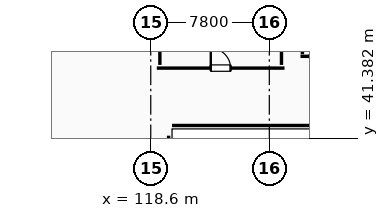
"""IFC4 building model, lengths in metres.
Left out: names, types, materials, properties, quantities, classifications, styles, units other than length and angle.
Written with IfcOpenShell. Run it as: python <this file> out.ifc"""

import sys

from ifc_helpers import new_model, si_unit, direction, frame, frame_2d, origin, origin_2d, place, context, subcontext, project, spatial, rectangle, extrude, element, fill, save


model = new_model("IFC4")
c1 = context("Model", 3, precision=1e-05, world=origin(), true_north=direction((0.0, 1.0)))
c2 = subcontext(c1, "Body", "Model", "MODEL_VIEW")
j1 = project(units=[si_unit("LENGTHUNIT", "METRE"), si_unit("PLANEANGLEUNIT", "RADIAN")], contexts=[c1])
p1 = place(None, origin())
s1 = spatial("IfcSite", under=j1, at=p1, CompositionType="ELEMENT")
p2 = place(p1, origin())
s2 = spatial("IfcBuilding", under=s1, at=p2, CompositionType="ELEMENT")
p3 = place(p2, frame((0.0, 0.0, -4.8)))
s3 = spatial("IfcBuildingStorey", under=s2, at=p3, CompositionType="ELEMENT", Elevation=-4.8)
p4 = place(p3, frame((112.6, 41.0, 0.0), z_axis=(0.0, 0.0, 1.0), x_axis=(1.0, 0.0, 0.0)))
e1 = element("IfcColumn", 1, at=p4, inside=s3, PredefinedType="COLUMN", context=c2, shape_type="SweptSolid", body=[
    extrude(rectangle(XDim=1.2, YDim=1.2, at=origin_2d()), origin(), (0.0, 0.0, 1.0), 4.8),
])
p5 = place(p3, frame((131.2, 42.225, 0.0), z_axis=(0.0, 0.0, 1.0), x_axis=(-1.0, 0.0, 0.0)))
e2 = element("IfcWall", 2, at=p5, inside=s3, PredefinedType="USERDEFINED", context=c2, shape_type="SweptSolid", body=[
    extrude(rectangle(XDim=11.2, YDim=0.45, at=frame_2d((5.6, 0.0))), origin(), (0.0, 0.0, 1.0), 4.38),
])
p6 = place(p3, frame((119.775, 41.555, 0.0), z_axis=(0.0, 0.0, 1.0), x_axis=(0.0, -1.0, 0.0)))
e3 = element("IfcWall", 3, at=p6, inside=s3, PredefinedType="USERDEFINED", context=c2, shape_type="SweptSolid", body=[
    extrude(rectangle(XDim=24.11, YDim=0.45, at=frame_2d((12.055, 0.0))), origin(), (0.0, 0.0, 1.0), 4.38),
])
p7 = place(p3, frame((119.0, 46.0, 0.0), z_axis=(0.0, 0.0, 1.0), x_axis=(1.0, 0.0, 0.0)))
e4 = element("IfcWall", 4, at=p7, inside=s3, PredefinedType="SHEAR", context=c2, shape_type="SweptSolid", body=[
    extrude(rectangle(XDim=8.4, YDim=0.4, at=frame_2d((4.2, 0.0))), origin(), (0.0, 0.0, 1.0), 4.48),
])
p8 = place(p7, frame((3.55, 0.0, 0.0)))
e5 = element("IfcOpeningElement", 5, at=p8, cuts=e4, PredefinedType="OPENING", context=c2, shape_type="SweptSolid", body=[
    extrude(rectangle(XDim=1.3, YDim=2.15, at=frame_2d((0.65, 1.075))), frame((0.0, 0.21, 0.0), z_axis=(0.0, -1.0, 0.0), x_axis=(1.0, 0.0, 0.0)), (0.0, 0.0, 1.0), 0.42),
])
for number, where, z_axis, x_axis in (
    (6, (127.2, 46.21, 0.0), (0.0, 0.0, 1.0), (0.0, 1.0, 0.0)),
    (7, (119.2, 54.59, 0.0), (0.0, 0.0, 1.0), (0.0, -1.0, 0.0)),
):
    element("IfcWall", number, at=place(p3, frame(where, z_axis=z_axis, x_axis=x_axis)), inside=s3, PredefinedType="SHEAR", context=c2, shape_type="SweptSolid", body=[
        extrude(rectangle(XDim=8.38, YDim=0.4, at=frame_2d((4.19, 0.0))), origin(), (0.0, 0.0, 1.0), 4.48),
    ])
p9 = place(p3, frame((128.45, 46.775, 0.0), z_axis=(0.0, 0.0, 1.0), x_axis=(1.0, 0.0, 0.0)))
e8 = element("IfcWall", 8, at=p9, inside=s3, PredefinedType="STANDARD", context=c2, shape_type="SweptSolid", body=[
    extrude(rectangle(XDim=2.3, YDim=0.25, at=frame_2d((1.15, 0.0))), origin(), (0.0, 0.0, 1.0), 4.47),
])
p10 = place(p9, frame((0.6, 0.0, 0.0)))
e9 = element("IfcOpeningElement", 9, at=p10, cuts=e8, PredefinedType="OPENING", context=c2, shape_type="SweptSolid", body=[
    extrude(rectangle(XDim=1.1, YDim=2.15, at=frame_2d((0.55, 1.075))), frame((0.0, 0.135, 0.0), z_axis=(0.0, -1.0, 0.0), x_axis=(1.0, 0.0, 0.0)), (0.0, 0.0, 1.0), 0.27),
])
p11 = place(p3, frame((128.575, 49.49, 0.0), z_axis=(0.0, 0.0, 1.0), x_axis=(0.0, -1.0, 0.0)))
e10 = element("IfcWall", 10, at=p11, inside=s3, PredefinedType="STANDARD", context=c2, shape_type="SweptSolid", body=[
    extrude(rectangle(XDim=2.58, YDim=0.25, at=frame_2d((1.29, 0.0))), origin(), (0.0, 0.0, 1.0), 4.47),
])
p12 = place(p8, origin())
e11 = element("IfcDoor", 11, at=p12, inside=s3, OperationType="SINGLE_SWING_LEFT", PredefinedType="DOOR", context=c2, shape_type="SweptSolid", body=[
    extrude(rectangle(XDim=1.3, YDim=2.15, at=frame_2d((0.65, 1.075))), frame((0.0, 0.025, 0.0), z_axis=(0.0, -1.0, 0.0), x_axis=(1.0, 0.0, 0.0)), (0.0, 0.0, 1.0), 0.05),
])
fill(e5, e11)
save(model, sys.argv[1])
